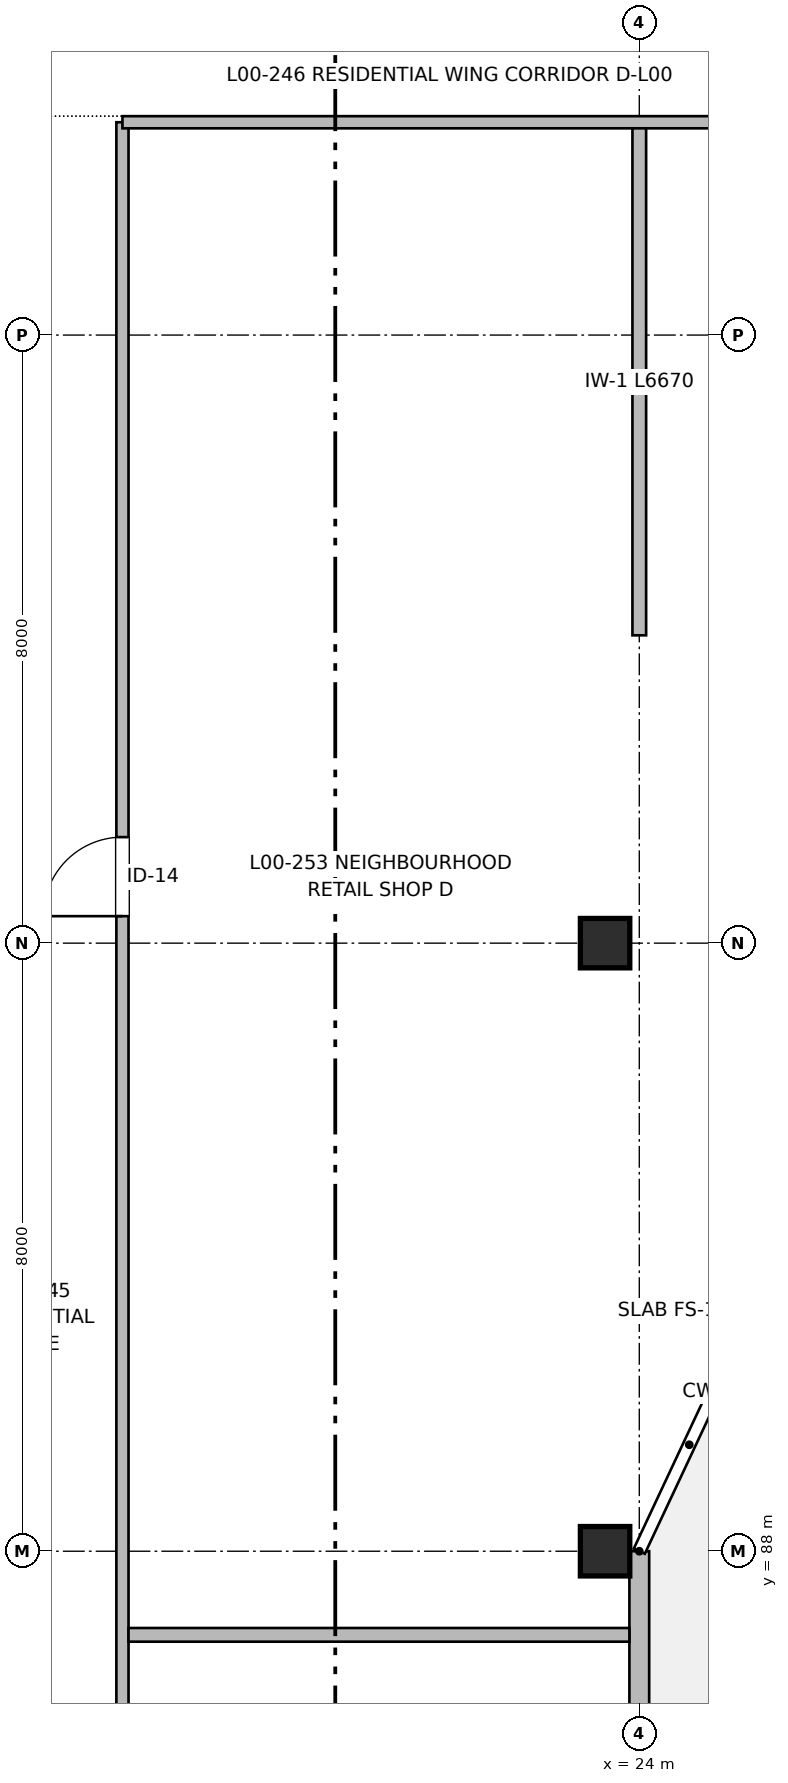
"""IFC4 building model, lengths in metres.
Left out: names, types, materials, properties, quantities, classifications, styles, units other than length and angle.
Written with IfcOpenShell. Run it as: python <this file> out.ifc"""

import sys

from ifc_helpers import new_model, si_unit, direction, frame, frame_2d, origin, origin_2d, place, context, subcontext, project, spatial, rectangle, extrude, element, fill, save


model = new_model("IFC4")
c1 = context("Model", 3, precision=1e-05, world=origin(), true_north=direction((0.0, 1.0)))
c2 = subcontext(c1, "Body", "Model", "MODEL_VIEW")
j1 = project(units=[si_unit("LENGTHUNIT", "METRE"), si_unit("PLANEANGLEUNIT", "RADIAN")], contexts=[c1])
p1 = place(None, origin())
s1 = spatial("IfcSite", under=j1, at=p1, CompositionType="ELEMENT")
p2 = place(p1, origin())
s2 = spatial("IfcBuilding", under=s1, at=p2, CompositionType="ELEMENT")
p3 = place(p2, origin())
s3 = spatial("IfcBuildingStorey", under=s2, at=p3, CompositionType="ELEMENT", Elevation=0.0)
for number, where, z_axis, x_axis in (
    (1, (23.55, 88.0, 0.0), (0.0, 0.0, 1.0), (1.0, 0.0, 0.0)),
    (2, (23.55, 96.0, 0.0), (0.0, 0.0, 1.0), (1.0, 0.0, 0.0)),
):
    element("IfcColumn", number, at=place(p3, frame(where, z_axis=z_axis, x_axis=x_axis)), inside=s3, PredefinedType="COLUMN", context=c2, shape_type="SweptSolid", body=[
        extrude(rectangle(XDim=0.65, YDim=0.65, at=origin_2d()), origin(), (0.0, 0.0, 1.0), 4.16),
    ])
p4 = place(p3, frame((24.0, 88.0, 0.0), z_axis=(0.0, 0.0, 1.0), x_axis=(0.0, -1.0, 0.0)))
e3 = element("IfcWall", 3, at=p4, inside=s3, PredefinedType="SOLIDWALL", context=c2, shape_type="SweptSolid", body=[
    extrude(rectangle(XDim=32.0, YDim=0.26, at=frame_2d((16.0, 0.0))), origin(), (0.0, 0.0, 1.0), 3.94),
])
p5 = place(p4, frame((3.3, 0.0, 0.0)))
e4 = element("IfcOpeningElement", 4, at=p5, cuts=e3, PredefinedType="OPENING", context=c2, shape_type="SweptSolid", body=[
    extrude(rectangle(XDim=1.3, YDim=2.2, at=frame_2d((0.65, 1.1))), frame((0.0, 0.14, 0.0), z_axis=(0.0, -1.0, 0.0), x_axis=(1.0, 0.0, 0.0)), (0.0, 0.0, 1.0), 0.28),
])
p6 = place(p4, frame((10.875, 0.0, 0.95)))
e5 = element("IfcOpeningElement", 5, at=p6, cuts=e3, PredefinedType="OPENING", context=c2, shape_type="SweptSolid", body=[
    extrude(rectangle(XDim=1.35, YDim=1.3, at=frame_2d((0.675, 0.65))), frame((0.0, 0.14, 0.0), z_axis=(0.0, -1.0, 0.0), x_axis=(1.0, 0.0, 0.0)), (0.0, 0.0, 1.0), 0.28),
])
p7 = place(p4, frame((19.375, 0.0, 0.95)))
e6 = element("IfcOpeningElement", 6, at=p7, cuts=e3, PredefinedType="OPENING", context=c2, shape_type="SweptSolid", body=[
    extrude(rectangle(XDim=2.15, YDim=1.8, at=frame_2d((1.075, 0.9))), frame((0.0, 0.14, 0.0), z_axis=(0.0, -1.0, 0.0), x_axis=(1.0, 0.0, 0.0)), (0.0, 0.0, 1.0), 0.28),
])
p8 = place(p4, frame((27.325, 0.0, 0.95)))
e7 = element("IfcOpeningElement", 7, at=p8, cuts=e3, PredefinedType="OPENING", context=c2, shape_type="SweptSolid", body=[
    extrude(rectangle(XDim=1.35, YDim=1.3, at=frame_2d((0.675, 0.65))), frame((0.0, 0.14, 0.0), z_axis=(0.0, -1.0, 0.0), x_axis=(1.0, 0.0, 0.0)), (0.0, 0.0, 1.0), 0.28),
])
p9 = place(p3, frame((17.2, 56.18, 0.0), z_axis=(0.0, 0.0, 1.0), x_axis=(0.0, 1.0, 0.0)))
e8 = element("IfcWall", 8, at=p9, inside=s3, PredefinedType="PARTITIONING", context=c2, shape_type="SweptSolid", body=[
    extrude(rectangle(XDim=50.62, YDim=0.16, at=frame_2d((25.31, 0.0))), origin(), (0.0, 0.0, 1.0), 3.895),
])
p10 = place(p9, frame((2.515, 0.0, 0.0)))
e9 = element("IfcOpeningElement", 9, at=p10, cuts=e8, PredefinedType="OPENING", context=c2, shape_type="SweptSolid", body=[
    extrude(rectangle(XDim=1.0, YDim=2.1, at=frame_2d((0.5, 1.05))), frame((0.0, 0.09, 0.0), z_axis=(0.0, -1.0, 0.0), x_axis=(1.0, 0.0, 0.0)), (0.0, 0.0, 1.0), 0.18),
])
p11 = place(p9, frame((8.92, 0.0, 0.0)))
e10 = element("IfcOpeningElement", 10, at=p11, cuts=e8, PredefinedType="OPENING", context=c2, shape_type="SweptSolid", body=[
    extrude(rectangle(XDim=1.0, YDim=2.1, at=frame_2d((0.5, 1.05))), frame((0.0, 0.09, 0.0), z_axis=(0.0, -1.0, 0.0), x_axis=(1.0, 0.0, 0.0)), (0.0, 0.0, 1.0), 0.18),
])
p12 = place(p9, frame((15.42, 0.0, 0.0)))
e11 = element("IfcOpeningElement", 11, at=p12, cuts=e8, PredefinedType="OPENING", context=c2, shape_type="SweptSolid", body=[
    extrude(rectangle(XDim=1.0, YDim=2.1, at=frame_2d((0.5, 1.05))), frame((0.0, 0.09, 0.0), z_axis=(0.0, -1.0, 0.0), x_axis=(1.0, 0.0, 0.0)), (0.0, 0.0, 1.0), 0.18),
])
p13 = place(p9, frame((24.42, 0.0, 0.0)))
e12 = element("IfcOpeningElement", 12, at=p13, cuts=e8, PredefinedType="OPENING", context=c2, shape_type="SweptSolid", body=[
    extrude(rectangle(XDim=0.96, YDim=2.15, at=frame_2d((0.48, 1.075))), frame((0.0, 0.09, 0.0), z_axis=(0.0, -1.0, 0.0), x_axis=(1.0, 0.0, 0.0)), (0.0, 0.0, 1.0), 0.18),
])
p14 = place(p9, frame((40.175, 0.0, 0.0)))
e13 = element("IfcOpeningElement", 13, at=p14, cuts=e8, PredefinedType="OPENING", context=c2, shape_type="SweptSolid", body=[
    extrude(rectangle(XDim=1.04, YDim=2.15, at=frame_2d((0.52, 1.075))), frame((0.0, 0.09, 0.0), z_axis=(0.0, -1.0, 0.0), x_axis=(1.0, 0.0, 0.0)), (0.0, 0.0, 1.0), 0.18),
])
p15 = place(p3, frame((17.2, 106.8, 0.0), z_axis=(0.0, 0.0, 1.0), x_axis=(1.0, 0.0, 0.0)))
e14 = element("IfcWall", 14, at=p15, inside=s3, PredefinedType="PARTITIONING", context=c2, shape_type="SweptSolid", body=[
    extrude(rectangle(XDim=17.62, YDim=0.16, at=frame_2d((8.81, 0.0))), origin(), (0.0, 0.0, 1.0), 3.895),
])
p16 = place(p15, frame((13.075, 0.0, 0.0)))
e15 = element("IfcOpeningElement", 15, at=p16, cuts=e14, PredefinedType="OPENING", context=c2, shape_type="SweptSolid", body=[
    extrude(rectangle(XDim=1.05, YDim=2.15, at=frame_2d((0.525, 1.075))), frame((0.0, 0.09, 0.0), z_axis=(0.0, -1.0, 0.0), x_axis=(1.0, 0.0, 0.0)), (0.0, 0.0, 1.0), 0.18),
])
p17 = place(p3, frame((24.0, 100.05, 0.0), z_axis=(0.0, 0.0, 1.0), x_axis=(0.0, 1.0, 0.0)))
e16 = element("IfcWall", 16, at=p17, inside=s3, PredefinedType="PARTITIONING", context=c2, shape_type="SweptSolid", body=[
    extrude(rectangle(XDim=6.67, YDim=0.18, at=frame_2d((3.335, 0.0))), origin(), (0.0, 0.0, 1.0), 3.895),
])
p18 = place(p3, frame((17.28, 86.9, 0.0), z_axis=(0.0, 0.0, 1.0), x_axis=(1.0, 0.0, 0.0)))
e17 = element("IfcWall", 17, at=p18, inside=s3, PredefinedType="PARTITIONING", context=c2, shape_type="SweptSolid", body=[
    extrude(rectangle(XDim=6.59, YDim=0.18, at=frame_2d((3.295, 0.0))), origin(), (0.0, 0.0, 1.0), 3.895),
])
p19 = place(p14, origin())
e18 = element("IfcDoor", 18, at=p19, inside=s3, OperationType="SINGLE_SWING_LEFT", PredefinedType="DOOR", context=c2, shape_type="SweptSolid", body=[
    extrude(rectangle(XDim=1.04, YDim=2.15, at=frame_2d((0.52, 1.075))), frame((0.0, 0.025, 0.0), z_axis=(0.0, -1.0, 0.0), x_axis=(1.0, 0.0, 0.0)), (0.0, 0.0, 1.0), 0.05),
])
fill(e13, e18)
save(model, sys.argv[1])
